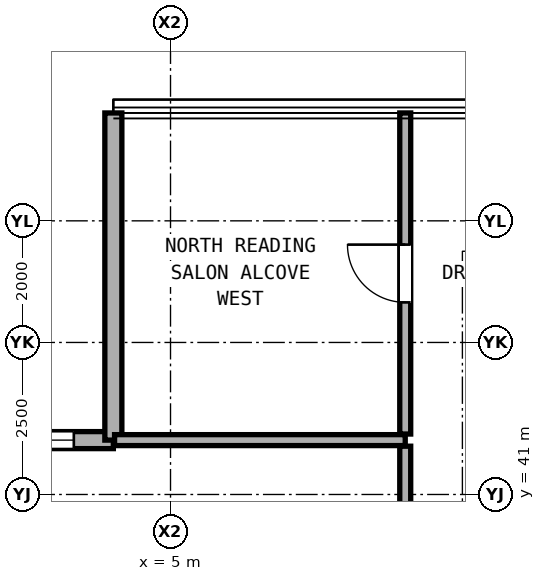
"""IFC4 building model, lengths in metres.
Left out: names, types, materials, properties, quantities, classifications, styles, units other than length and angle.
Written with IfcOpenShell. Run it as: python <this file> out.ifc"""

import sys

from ifc_helpers import new_model, si_unit, direction, frame, frame_2d, origin, place, context, subcontext, project, spatial, rectangle, extrude, element, fill, save


model = new_model("IFC4")
c1 = context("Model", 3, precision=1e-05, world=origin(), true_north=direction((0.0, 1.0)))
c2 = subcontext(c1, "Body", "Model", "MODEL_VIEW")
j1 = project(units=[si_unit("LENGTHUNIT", "METRE"), si_unit("PLANEANGLEUNIT", "RADIAN")], contexts=[c1])
p1 = place(None, origin())
s1 = spatial("IfcSite", under=j1, at=p1, CompositionType="ELEMENT")
p2 = place(p1, origin())
s2 = spatial("IfcBuilding", under=s1, at=p2, CompositionType="ELEMENT")
p3 = place(p2, frame((0.0, 0.0, 32.3)))
s3 = spatial("IfcBuildingStorey", under=s2, at=p3, CompositionType="ELEMENT", Elevation=32.3)
p4 = place(p3, frame((4.06, 41.894, 0.0), z_axis=(0.0, 0.0, 1.0), x_axis=(-1.0, 0.0, 0.0)))
e1 = element("IfcWall", 1, at=p4, inside=s3, PredefinedType="SOLIDWALL", context=c2, shape_type="SweptSolid", body=[
    extrude(rectangle(XDim=5.38, YDim=0.28, at=frame_2d((2.69, 0.0))), origin(), (0.0, 0.0, 1.0), 3.04),
])
p5 = place(p4, frame((0.65, 0.0, 0.85)))
e2 = element("IfcOpeningElement", 2, at=p5, cuts=e1, PredefinedType="OPENING", context=c2, shape_type="SweptSolid", body=[
    extrude(rectangle(XDim=1.1, YDim=2.0, at=frame_2d((0.55, 1.0))), frame((0.0, 0.15, 0.0), z_axis=(0.0, -1.0, 0.0), x_axis=(1.0, 0.0, 0.0)), (0.0, 0.0, 1.0), 0.3),
])
p6 = place(p3, frame((4.06, 47.274, 0.0), z_axis=(0.0, 0.0, 1.0), x_axis=(0.0, -1.0, 0.0)))
e3 = element("IfcWall", 3, at=p6, inside=s3, PredefinedType="SOLIDWALL", context=c2, shape_type="SweptSolid", body=[
    extrude(rectangle(XDim=5.38, YDim=0.28, at=frame_2d((2.69, 0.0))), origin(), (0.0, 0.0, 1.0), 3.04),
])
p7 = place(p3, frame((4.08, 41.894, 0.0), z_axis=(0.0, 0.0, 1.0), x_axis=(1.0, 0.0, 0.0)))
e4 = element("IfcWall", 4, at=p7, inside=s3, PredefinedType="PARTITIONING", context=c2, shape_type="SweptSolid", body=[
    extrude(rectangle(XDim=4.78, YDim=0.18, at=frame_2d((2.39, 0.0))), origin(), (0.0, 0.0, 1.0), 3.06),
])
p8 = place(p3, frame((8.86, 33.6, 0.0), z_axis=(0.0, 0.0, 1.0), x_axis=(0.0, 1.0, 0.0)))
e5 = element("IfcWall", 5, at=p8, inside=s3, PredefinedType="PARTITIONING", context=c2, shape_type="SweptSolid", body=[
    extrude(rectangle(XDim=8.194, YDim=0.18, at=frame_2d((4.097, 0.0))), origin(), (0.0, 0.0, 1.0), 2.436),
])
p9 = place(p8, frame((3.572, 0.0, 0.0)))
e6 = element("IfcOpeningElement", 6, at=p9, cuts=e5, PredefinedType="OPENING", context=c2, shape_type="SweptSolid", body=[
    extrude(rectangle(XDim=1.05, YDim=2.2, at=frame_2d((0.525, 1.1))), frame((0.0, 0.1, 0.0), z_axis=(0.0, -1.0, 0.0), x_axis=(1.0, 0.0, 0.0)), (0.0, 0.0, 1.0), 0.2),
])
p10 = place(p3, frame((8.86, 41.994, 0.0), z_axis=(0.0, 0.0, 1.0), x_axis=(0.0, 1.0, 0.0)))
e7 = element("IfcWall", 7, at=p10, inside=s3, PredefinedType="PARTITIONING", context=c2, shape_type="SweptSolid", body=[
    extrude(rectangle(XDim=5.28, YDim=0.18, at=frame_2d((2.64, 0.0))), origin(), (0.0, 0.0, 1.0), 3.06),
])
p11 = place(p10, frame((2.165, 0.0, 0.0)))
e8 = element("IfcOpeningElement", 8, at=p11, cuts=e7, PredefinedType="OPENING", context=c2, shape_type="SweptSolid", body=[
    extrude(rectangle(XDim=0.95, YDim=2.15, at=frame_2d((0.475, 1.075))), frame((0.0, 0.1, 0.0), z_axis=(0.0, -1.0, 0.0), x_axis=(1.0, 0.0, 0.0)), (0.0, 0.0, 1.0), 0.2),
])
p12 = place(p5, origin())
e9 = element("IfcWindow", 9, at=p12, inside=s3, PartitioningType="SINGLE_PANEL", PredefinedType="WINDOW", context=c2, shape_type="SweptSolid", body=[
    extrude(rectangle(XDim=1.1, YDim=2.0, at=frame_2d((0.55, 1.0))), frame((0.0, 0.03, 0.0), z_axis=(0.0, -1.0, 0.0), x_axis=(1.0, 0.0, 0.0)), (0.0, 0.0, 1.0), 0.06),
])
fill(e2, e9)
p13 = place(p11, origin())
e10 = element("IfcDoor", 10, at=p13, inside=s3, OperationType="SINGLE_SWING_RIGHT", PredefinedType="DOOR", context=c2, shape_type="SweptSolid", body=[
    extrude(rectangle(XDim=0.95, YDim=2.15, at=frame_2d((0.475, 1.075))), frame((0.0, 0.025, 0.0), z_axis=(0.0, -1.0, 0.0), x_axis=(1.0, 0.0, 0.0)), (0.0, 0.0, 1.0), 0.05),
])
fill(e8, e10)
save(model, sys.argv[1])
